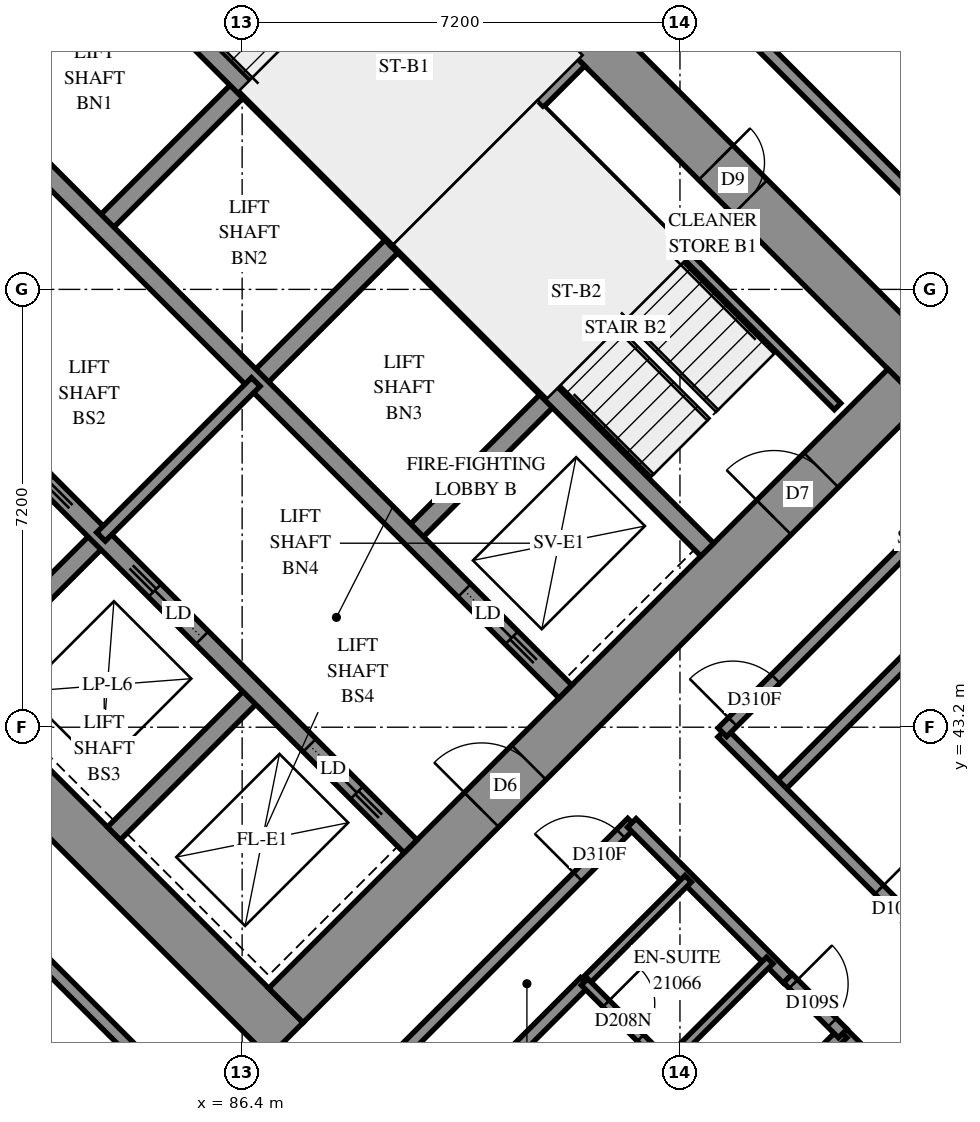
"""IFC4 building model, lengths in metres.
Left out: names, types, materials, properties, quantities, classifications, styles, units other than length and angle.
Written with IfcOpenShell. Run it as: python <this file> out.ifc"""

import sys

from ifc_helpers import new_model, si_unit, direction, frame, frame_2d, origin, place, context, subcontext, project, spatial, polyline, rectangle, outline, extrude, element, fill, save


model = new_model("IFC4")
c1 = context("Model", 3, precision=1e-05, world=origin(), true_north=direction((0.0, 1.0)))
c2 = subcontext(c1, "Body", "Model", "MODEL_VIEW")
j1 = project(units=[si_unit("LENGTHUNIT", "METRE"), si_unit("PLANEANGLEUNIT", "RADIAN")], contexts=[c1])
p1 = place(None, origin())
s1 = spatial("IfcSite", under=j1, at=p1, CompositionType="ELEMENT")
p2 = place(p1, origin())
s2 = spatial("IfcBuilding", under=s1, at=p2, CompositionType="ELEMENT")
p3 = place(p2, frame((0.0, 0.0, 81.2)))
s3 = spatial("IfcBuildingStorey", under=s2, at=p3, CompositionType="ELEMENT", Elevation=81.2)
p4 = place(p3, frame((75.806, 49.373, -0.3), z_axis=(0.0, 0.0, 1.0), x_axis=(0.7071067812, -0.7071067812, 0.0)))
e1 = element("IfcWall", 1, at=p4, inside=s3, PredefinedType="SHEAR", context=c2, shape_type="SweptSolid", body=[
    extrude(rectangle(XDim=16.0, YDim=0.8, at=frame_2d((8.0, 0.0))), origin(), (0.0, 0.0, 1.0), 2.7),
])
p5 = place(p3, frame((86.554, 60.121, -0.3), z_axis=(0.0, 0.0, 1.0), x_axis=(0.7071067812, -0.7071067812, 0.0)))
e2 = element("IfcWall", 2, at=p5, inside=s3, PredefinedType="SHEAR", context=c2, shape_type="SweptSolid", body=[
    extrude(rectangle(XDim=16.0, YDim=0.8, at=frame_2d((8.0, 0.0))), origin(), (0.0, 0.0, 1.0), 2.7),
])
p6 = place(p5, frame((10.8, 0.0, 0.3)))
e3 = element("IfcOpeningElement", 3, at=p6, cuts=e2, PredefinedType="OPENING", context=c2, shape_type="SweptSolid", body=[
    extrude(rectangle(XDim=0.8, YDim=2.1, at=frame_2d((0.4, 1.05))), frame((0.0, 0.41, 0.0), z_axis=(0.0, -1.0, 0.0), x_axis=(1.0, 0.0, 0.0)), (0.0, 0.0, 1.0), 0.82),
])
p7 = place(p3, frame((76.372, 49.373, -0.3), z_axis=(0.0, 0.0, 1.0), x_axis=(0.7071067812, 0.7071067812, 0.0)))
e4 = element("IfcWall", 4, at=p7, inside=s3, PredefinedType="SHEAR", context=c2, shape_type="SweptSolid", body=[
    extrude(rectangle(XDim=14.4, YDim=0.8, at=frame_2d((7.2, 0.0))), origin(), (0.0, 0.0, 1.0), 2.7),
])
p8 = place(p7, frame((4.55, 0.0, 0.3)))
e5 = element("IfcOpeningElement", 5, at=p8, cuts=e4, PredefinedType="OPENING", context=c2, shape_type="SweptSolid", body=[
    extrude(rectangle(XDim=1.1, YDim=2.1, at=frame_2d((0.55, 1.05))), frame((0.0, 0.41, 0.0), z_axis=(0.0, -1.0, 0.0), x_axis=(1.0, 0.0, 0.0)), (0.0, 0.0, 1.0), 0.82),
])
p9 = place(p7, frame((11.35, 0.0, 0.3)))
e6 = element("IfcOpeningElement", 6, at=p9, cuts=e4, PredefinedType="OPENING", context=c2, shape_type="SweptSolid", body=[
    extrude(rectangle(XDim=1.1, YDim=2.1, at=frame_2d((0.55, 1.05))), frame((0.0, 0.41, 0.0), z_axis=(0.0, -1.0, 0.0), x_axis=(1.0, 0.0, 0.0)), (0.0, 0.0, 1.0), 0.82),
])
p10 = place(p3, frame((87.12, 38.625, -0.3), z_axis=(0.0, 0.0, 1.0), x_axis=(0.7071067812, 0.7071067812, 0.0)))
e7 = element("IfcWall", 7, at=p10, inside=s3, PredefinedType="SHEAR", context=c2, shape_type="SweptSolid", body=[
    extrude(rectangle(XDim=14.4, YDim=0.8, at=frame_2d((7.2, 0.0))), origin(), (0.0, 0.0, 1.0), 2.7),
])
p11 = place(p10, frame((4.55, 0.0, 0.3)))
e8 = element("IfcOpeningElement", 8, at=p11, cuts=e7, PredefinedType="OPENING", context=c2, shape_type="SweptSolid", body=[
    extrude(rectangle(XDim=1.1, YDim=2.1, at=frame_2d((0.55, 1.05))), frame((0.0, 0.41, 0.0), z_axis=(0.0, -1.0, 0.0), x_axis=(1.0, 0.0, 0.0)), (0.0, 0.0, 1.0), 0.82),
])
p12 = place(p10, frame((11.35, 0.0, 0.3)))
e9 = element("IfcOpeningElement", 9, at=p12, cuts=e7, PredefinedType="OPENING", context=c2, shape_type="SweptSolid", body=[
    extrude(rectangle(XDim=1.1, YDim=2.1, at=frame_2d((0.55, 1.05))), frame((0.0, 0.41, 0.0), z_axis=(0.0, -1.0, 0.0), x_axis=(1.0, 0.0, 0.0)), (0.0, 0.0, 1.0), 0.82),
])
p13 = place(p3, frame((84.079, 51.423, 0.0), z_axis=(0.0, 0.0, 1.0), x_axis=(0.7071219326, 0.7070916295, 0.0)))
e10 = element("IfcWall", 10, at=p13, inside=s3, PredefinedType="SOLIDWALL", context=c2, shape_type="SweptSolid", body=[
    extrude(rectangle(XDim=3.3, YDim=0.3, at=frame_2d((1.65, 0.0))), origin(), (0.0, 0.0, 1.0), 3.1),
])
p14 = place(p3, frame((81.746, 43.999, 0.0), z_axis=(0.0, 0.0, 1.0), x_axis=(0.7071067812, 0.7071067812, 0.0)))
e11 = element("IfcWall", 11, at=p14, inside=s3, PredefinedType="SOLIDWALL", context=c2, shape_type="SweptSolid", body=[
    extrude(rectangle(XDim=3.3, YDim=0.3, at=frame_2d((1.65, 0.0))), origin(), (0.0, 0.0, 1.0), 3.1),
])
p15 = place(p3, frame((86.625, 48.878, 0.0), z_axis=(0.0, 0.0, 1.0), x_axis=(0.7071067812, 0.7071067812, 0.0)))
e12 = element("IfcWall", 12, at=p15, inside=s3, PredefinedType="SOLIDWALL", context=c2, shape_type="SweptSolid", body=[
    extrude(rectangle(XDim=3.3, YDim=0.3, at=frame_2d((1.65, 0.0))), origin(), (0.0, 0.0, 1.0), 3.1),
])
p16 = place(p3, frame((84.291, 41.453, 0.0), z_axis=(0.0, 0.0, 1.0), x_axis=(0.7071067812, 0.7071067812, 0.0)))
e13 = element("IfcWall", 13, at=p16, inside=s3, PredefinedType="SOLIDWALL", context=c2, shape_type="SweptSolid", body=[
    extrude(rectangle(XDim=3.3, YDim=0.3, at=frame_2d((1.65, 0.0))), origin(), (0.0, 0.0, 1.0), 3.1),
])
p17 = place(p3, frame((89.17, 46.332, 0.0), z_axis=(0.0, 0.0, 1.0), x_axis=(0.7071067812, 0.7071067812, 0.0)))
e14 = element("IfcWall", 14, at=p17, inside=s3, PredefinedType="SOLIDWALL", context=c2, shape_type="SweptSolid", body=[
    extrude(rectangle(XDim=3.3, YDim=0.3, at=frame_2d((1.65, 0.0))), origin(), (0.0, 0.0, 1.0), 3.1),
])
p18 = place(p3, frame((78.988, 51.423, 0.0), z_axis=(0.0, 0.0, 1.0), x_axis=(0.7071067812, -0.7071067812, 0.0)))
e15 = element("IfcWall", 15, at=p18, inside=s3, PredefinedType="SOLIDWALL", context=c2, shape_type="SweptSolid", body=[
    extrude(rectangle(XDim=14.4, YDim=0.3, at=frame_2d((7.2, 0.0))), origin(), (0.0, 0.0, 1.0), 3.1),
])
p19 = place(p18, frame((1.25, 0.0, 0.0)))
e16 = element("IfcOpeningElement", 16, at=p19, cuts=e15, PredefinedType="OPENING", context=c2, shape_type="SweptSolid", body=[
    extrude(rectangle(XDim=1.1, YDim=2.1, at=frame_2d((0.55, 1.05))), frame((0.0, 0.16, 0.0), z_axis=(0.0, -1.0, 0.0), x_axis=(1.0, 0.0, 0.0)), (0.0, 0.0, 1.0), 0.32),
])
p20 = place(p18, frame((4.85, 0.0, 0.0)))
e17 = element("IfcOpeningElement", 17, at=p20, cuts=e15, PredefinedType="OPENING", context=c2, shape_type="SweptSolid", body=[
    extrude(rectangle(XDim=1.1, YDim=2.1, at=frame_2d((0.55, 1.05))), frame((0.0, 0.16, 0.0), z_axis=(0.0, -1.0, 0.0), x_axis=(1.0, 0.0, 0.0)), (0.0, 0.0, 1.0), 0.32),
])
p21 = place(p18, frame((8.45, 0.0, 0.0)))
e18 = element("IfcOpeningElement", 18, at=p21, cuts=e15, PredefinedType="OPENING", context=c2, shape_type="SweptSolid", body=[
    extrude(rectangle(XDim=1.1, YDim=2.1, at=frame_2d((0.55, 1.05))), frame((0.0, 0.16, 0.0), z_axis=(0.0, -1.0, 0.0), x_axis=(1.0, 0.0, 0.0)), (0.0, 0.0, 1.0), 0.32),
])
p22 = place(p18, frame((12.05, 0.0, 0.0)))
e19 = element("IfcOpeningElement", 19, at=p22, cuts=e15, PredefinedType="OPENING", context=c2, shape_type="SweptSolid", body=[
    extrude(rectangle(XDim=1.1, YDim=2.1, at=frame_2d((0.55, 1.05))), frame((0.0, 0.16, 0.0), z_axis=(0.0, -1.0, 0.0), x_axis=(1.0, 0.0, 0.0)), (0.0, 0.0, 1.0), 0.32),
])
p23 = place(p3, frame((81.534, 53.969, 0.0), z_axis=(0.0, 0.0, 1.0), x_axis=(0.707103309, -0.7071102534, 0.0)))
e20 = element("IfcWall", 20, at=p23, inside=s3, PredefinedType="SOLIDWALL", context=c2, shape_type="SweptSolid", body=[
    extrude(rectangle(XDim=14.4, YDim=0.3, at=frame_2d((7.2, 0.0))), origin(), (0.0, 0.0, 1.0), 3.1),
])
p24 = place(p23, frame((12.05, 0.0, 0.0)))
e21 = element("IfcOpeningElement", 21, at=p24, cuts=e20, PredefinedType="OPENING", context=c2, shape_type="SweptSolid", body=[
    extrude(rectangle(XDim=1.1, YDim=2.1, at=frame_2d((0.55, 1.05))), frame((0.0, 0.16, 0.0), z_axis=(0.0, -1.0, 0.0), x_axis=(1.0, 0.0, 0.0)), (0.0, 0.0, 1.0), 0.32),
])
for number, where, z_axis, x_axis in (
    (22, (83.867, 56.302, 0.0), (0.0, 0.0, 1.0), (0.707, -0.707, 0.0)),
    (23, (88.958, 51.211, 0.0), (0.0, 0.0, 1.0), (0.707, -0.707, 0.0)),
):
    element("IfcWall", number, at=place(p3, frame(where, z_axis=z_axis, x_axis=x_axis)), inside=s3, PredefinedType="SOLIDWALL", context=c2, shape_type="SweptSolid", body=[
        extrude(rectangle(XDim=7.2, YDim=0.3, at=frame_2d((3.6, 0.0))), origin(), (0.0, 0.0, 1.0), 3.1),
    ])
p25 = place(p3, frame((88.958, 51.211, 0.0), z_axis=(0.0, 0.0, 1.0), x_axis=(0.7071067812, 0.7071067812, 0.0)))
e24 = element("IfcWall", 24, at=p25, inside=s3, PredefinedType="SOLIDWALL", context=c2, shape_type="SweptSolid", body=[
    extrude(rectangle(XDim=4.2, YDim=0.3, at=frame_2d((2.1, 0.0))), origin(), (0.0, 0.0, 1.0), 3.1),
])
p26 = place(p3, frame((98.712, 54.219, 0.0), z_axis=(0.0, 0.0, 1.0), x_axis=(-0.7664437954, 0.6423113798, 0.0)))
e25 = element("IfcWall", 25, at=p26, inside=s3, PredefinedType="SOLIDWALL", context=c2, shape_type="SweptSolid", body=[
    extrude(outline(polyline([(-0.024, -0.275), (3.394, -0.275), (3.442, 0.275), (0.024, 0.275), (-0.024, -0.275)])), origin(), (0.0, 0.0, 1.0), 3.1),
])
p27 = place(p26, frame((1.596, 0.0, 0.5)))
e26 = element("IfcOpeningElement", 26, at=p27, cuts=e25, PredefinedType="OPENING", context=c2, shape_type="SweptSolid", body=[
    extrude(rectangle(XDim=1.2, YDim=2.45, at=frame_2d((0.6, 1.225))), frame((0.0, 0.285, 0.0), z_axis=(0.0, -1.0, 0.0), x_axis=(1.0, 0.0, 0.0)), (0.0, 0.0, 1.0), 0.57),
])
p28 = place(p3, frame((91.313, 53.354, 0.0), z_axis=(0.0, 0.0, 1.0), x_axis=(0.7071140275, -0.7070995348, 0.0)))
e27 = element("IfcWall", 27, at=p28, inside=s3, PredefinedType="PARTITIONING", context=c2, shape_type="SweptSolid", body=[
    extrude(rectangle(XDim=6.9, YDim=0.15, at=frame_2d((3.45, 0.0))), origin(), (0.0, 0.0, 1.0), 3.1),
])
p29 = place(p3, frame((84.079, 46.332, 0.0), z_axis=(0.0, 0.0, 1.0), x_axis=(0.7071067812, 0.7071067812, 0.0)))
e28 = element("IfcWall", 28, at=p29, inside=s3, PredefinedType="PARTITIONING", context=c2, shape_type="SweptSolid", body=[
    extrude(rectangle(XDim=3.6, YDim=0.2, at=frame_2d((1.8, 0.0))), origin(), (0.0, 0.0, 1.0), 3.1),
])
p30 = place(p3, frame((87.894, 61.461, 0.0), z_axis=(0.0, 0.0, 1.0), x_axis=(0.7071067812, -0.7071067812, 0.0)))
e29 = element("IfcWall", 29, at=p30, inside=s3, PredefinedType="PARTITIONING", context=c2, shape_type="SweptSolid", body=[
    extrude(rectangle(XDim=17.5, YDim=0.2, at=frame_2d((8.75, 0.0))), origin(), (0.0, 0.0, 1.0), 3.1),
])
p31 = place(p30, frame((8.735, 0.0, 0.0)))
e30 = element("IfcOpeningElement", 30, at=p31, cuts=e29, PredefinedType="OPENING", context=c2, shape_type="SweptSolid", body=[
    extrude(rectangle(XDim=0.9, YDim=2.1, at=frame_2d((0.45, 1.05))), frame((0.0, 0.11, 0.0), z_axis=(0.0, -1.0, 0.0), x_axis=(1.0, 0.0, 0.0)), (0.0, 0.0, 1.0), 0.22),
])
p32 = place(p3, frame((95.215, 42.197, 0.0), z_axis=(0.0, 0.0, 1.0), x_axis=(0.7071114855, 0.7071020769, 0.0)))
e31 = element("IfcWall", 31, at=p32, inside=s3, PredefinedType="PARTITIONING", context=c2, shape_type="SweptSolid", body=[
    extrude(rectangle(XDim=10.629, YDim=0.2, at=frame_2d((5.314, 0.0))), origin(), (0.0, 0.0, 1.0), 3.1),
])
p33 = place(p3, frame((94.294, 43.111, 0.0), z_axis=(0.0, 0.0, 1.0), x_axis=(0.7071067812, -0.7071067812, 0.0)))
e32 = element("IfcWall", 32, at=p33, inside=s3, PredefinedType="PARTITIONING", context=c2, shape_type="SweptSolid", body=[
    extrude(rectangle(XDim=8.499, YDim=0.2, at=frame_2d((4.25, 0.0))), origin(), (0.0, 0.0, 1.0), 3.1),
])
p34 = place(p33, frame((3.651, 0.0, 0.0)))
e33 = element("IfcOpeningElement", 33, at=p34, cuts=e32, PredefinedType="OPENING", context=c2, shape_type="SweptSolid", body=[
    extrude(rectangle(XDim=0.9, YDim=2.1, at=frame_2d((0.45, 1.05))), frame((0.0, 0.11, 0.0), z_axis=(0.0, -1.0, 0.0), x_axis=(1.0, 0.0, 0.0)), (0.0, 0.0, 1.0), 0.22),
])
p35 = place(p3, frame((86.835, 35.655, 0.0), z_axis=(0.0, 0.0, 1.0), x_axis=(0.7071067812, 0.7071067812, 0.0)))
e34 = element("IfcWall", 34, at=p35, inside=s3, PredefinedType="PARTITIONING", context=c2, shape_type="SweptSolid", body=[
    extrude(rectangle(XDim=8.451, YDim=0.2, at=frame_2d((4.226, 0.0))), origin(), (0.0, 0.0, 1.0), 3.1),
])
p36 = place(p35, frame((7.192, 0.0, 0.0)))
e35 = element("IfcOpeningElement", 35, at=p36, cuts=e34, PredefinedType="OPENING", context=c2, shape_type="SweptSolid", body=[
    extrude(rectangle(XDim=1.0, YDim=2.1, at=frame_2d((0.5, 1.05))), frame((0.0, 0.11, 0.0), z_axis=(0.0, -1.0, 0.0), x_axis=(1.0, 0.0, 0.0)), (0.0, 0.0, 1.0), 0.22),
])
p37 = place(p3, frame((94.297, 43.117, 0.0), z_axis=(0.0, 0.0, 1.0), x_axis=(0.7071067812, 0.7071067812, 0.0)))
e36 = element("IfcWall", 36, at=p37, inside=s3, PredefinedType="PARTITIONING", context=c2, shape_type="SweptSolid", body=[
    extrude(rectangle(XDim=8.448, YDim=0.2, at=frame_2d((4.224, 0.0))), origin(), (0.0, 0.0, 1.0), 3.1),
])
p38 = place(p37, frame((0.242, 0.0, 0.0)))
e37 = element("IfcOpeningElement", 37, at=p38, cuts=e36, PredefinedType="OPENING", context=c2, shape_type="SweptSolid", body=[
    extrude(rectangle(XDim=1.0, YDim=2.1, at=frame_2d((0.5, 1.05))), frame((0.0, 0.11, 0.0), z_axis=(0.0, -1.0, 0.0), x_axis=(1.0, 0.0, 0.0)), (0.0, 0.0, 1.0), 0.22),
])
p39 = place(p3, frame((86.351, 33.325, 0.0), z_axis=(0.0, 0.0, 1.0), x_axis=(0.7069824066, 0.7072311339, 0.0)))
e38 = element("IfcWall", 38, at=p39, inside=s3, PredefinedType="PARTITIONING", context=c2, shape_type="SweptSolid", body=[
    extrude(rectangle(XDim=8.041, YDim=0.2, at=frame_2d((4.021, 0.0))), origin(), (0.0, 0.0, 1.0), 3.1),
])
p40 = place(p3, frame((80.948, 41.536, 0.0), z_axis=(0.0, 0.0, 1.0), x_axis=(0.7071067812, -0.7071067812, 0.0)))
e39 = element("IfcWall", 39, at=p40, inside=s3, PredefinedType="PARTITIONING", context=c2, shape_type="SweptSolid", body=[
    extrude(rectangle(XDim=6.822, YDim=0.2, at=frame_2d((3.411, 0.0))), origin(), (0.0, 0.0, 1.0), 3.1),
])
p41 = place(p3, frame((92.809, 41.627, 0.0), z_axis=(0.0, 0.0, 1.0), x_axis=(0.7071067812, -0.7071067812, 0.0)))
e40 = element("IfcWall", 40, at=p41, inside=s3, PredefinedType="PARTITIONING", context=c2, shape_type="SweptSolid", body=[
    extrude(rectangle(XDim=3.623, YDim=0.2, at=frame_2d((1.812, 0.0))), origin(), (0.0, 0.0, 1.0), 3.1),
])
p42 = place(p3, frame((96.274, 38.162, 0.0), z_axis=(0.0, 0.0, 1.0), x_axis=(0.7071067812, -0.7071067812, 0.0)))
e41 = element("IfcWall", 41, at=p42, inside=s3, PredefinedType="PARTITIONING", context=c2, shape_type="SweptSolid", body=[
    extrude(rectangle(XDim=3.1, YDim=0.2, at=frame_2d((1.55, 0.0))), origin(), (0.0, 0.0, 1.0), 3.1),
])
for number, where, z_axis, x_axis in (
    (42, (92.037, 39.011, 0.0), (0.0, 0.0, 1.0), (0.708, 0.707, 0.0)),
    (43, (93.381, 37.667, 0.0), (0.0, 0.0, 1.0), (0.707, 0.708, 0.0)),
):
    element("IfcWall", number, at=place(p3, frame(where, z_axis=z_axis, x_axis=x_axis)), inside=s3, PredefinedType="PARTITIONING", context=c2, shape_type="SweptSolid", body=[
        extrude(rectangle(XDim=2.4, YDim=0.15, at=frame_2d((1.2, 0.0))), origin(), (0.0, 0.0, 1.0), 3.1),
    ])
p43 = place(p3, frame((92.031, 39.011, 0.0), z_axis=(0.0, 0.0, 1.0), x_axis=(0.7071067812, -0.7071067812, 0.0)))
e44 = element("IfcWall", 44, at=p43, inside=s3, PredefinedType="PARTITIONING", context=c2, shape_type="SweptSolid", body=[
    extrude(rectangle(XDim=1.901, YDim=0.15, at=frame_2d((0.95, 0.0))), origin(), (0.0, 0.0, 1.0), 3.1),
])
p44 = place(p43, frame((0.502, 0.0, 0.0)))
e45 = element("IfcOpeningElement", 45, at=p44, cuts=e44, PredefinedType="OPENING", context=c2, shape_type="SweptSolid", body=[
    extrude(rectangle(XDim=0.8, YDim=2.1, at=frame_2d((0.4, 1.05))), frame((0.0, 0.085, 0.0), z_axis=(0.0, -1.0, 0.0), x_axis=(1.0, 0.0, 0.0)), (0.0, 0.0, 1.0), 0.17),
])
p45 = place(p3, frame((94.973, 36.863, 0.0), z_axis=(0.0, 0.0, 1.0), x_axis=(0.7071067812, 0.7071067812, 0.0)))
e46 = element("IfcWall", 46, at=p45, inside=s3, PredefinedType="PARTITIONING", context=c2, shape_type="SweptSolid", body=[
    extrude(rectangle(XDim=1.841, YDim=0.2, at=frame_2d((0.921, 0.0))), origin(), (0.0, 0.0, 1.0), 3.1),
])
p46 = place(p3, frame((95.375, 39.069, 0.0), z_axis=(0.0, 0.0, 1.0), x_axis=(0.7063232841, -0.7078894111, 0.0)))
e47 = element("IfcWall", 47, at=p46, inside=s3, PredefinedType="PARTITIONING", context=c2, shape_type="SweptSolid", body=[
    extrude(rectangle(XDim=1.277, YDim=0.2, at=frame_2d((0.638, 0.0))), origin(), (0.0, 0.0, 1.0), 3.1),
])
p47 = place(p46, frame((0.129, 0.0, 0.0)))
e48 = element("IfcOpeningElement", 48, at=p47, cuts=e47, PredefinedType="OPENING", context=c2, shape_type="SweptSolid", body=[
    extrude(rectangle(XDim=0.9, YDim=2.1, at=frame_2d((0.45, 1.05))), frame((0.0, 0.11, 0.0), z_axis=(0.0, -1.0, 0.0), x_axis=(1.0, 0.0, 0.0)), (0.0, 0.0, 1.0), 0.22),
])
p48 = place(p6, origin())
e49 = element("IfcDoor", 49, at=p48, inside=s3, OperationType="SINGLE_SWING_RIGHT", PredefinedType="DOOR", context=c2, shape_type="SweptSolid", body=[
    extrude(rectangle(XDim=0.8, YDim=2.1, at=frame_2d((0.4, 1.05))), frame((0.0, -0.34, 0.0), z_axis=(0.0, -1.0, 0.0), x_axis=(1.0, 0.0, 0.0)), (0.0, 0.0, 1.0), 0.05),
])
fill(e3, e49)
p49 = place(p11, origin())
e50 = element("IfcDoor", 50, at=p49, inside=s3, OperationType="DOUBLE_DOOR_SINGLE_SWING", PredefinedType="DOOR", context=c2, shape_type="SweptSolid", body=[
    extrude(rectangle(XDim=1.1, YDim=2.1, at=frame_2d((0.55, 1.05))), frame((0.0, 0.025, 0.0), z_axis=(0.0, -1.0, 0.0), x_axis=(1.0, 0.0, 0.0)), (0.0, 0.0, 1.0), 0.05),
])
fill(e8, e50)
p50 = place(p12, origin())
e51 = element("IfcDoor", 51, at=p50, inside=s3, OperationType="SINGLE_SWING_RIGHT", PredefinedType="DOOR", context=c2, shape_type="SweptSolid", body=[
    extrude(rectangle(XDim=1.1, YDim=2.1, at=frame_2d((0.55, 1.05))), frame((0.0, 0.025, 0.0), z_axis=(0.0, -1.0, 0.0), x_axis=(1.0, 0.0, 0.0)), (0.0, 0.0, 1.0), 0.05),
])
fill(e9, e51)
p51 = place(p21, origin())
e52 = element("IfcDoor", 52, at=p51, inside=s3, OperationType="SLIDING_TO_LEFT", PredefinedType="DOOR", context=c2, shape_type="SweptSolid", body=[
    extrude(rectangle(XDim=1.1, YDim=2.1, at=frame_2d((0.55, 1.05))), frame((0.0, 0.025, 0.0), z_axis=(0.0, -1.0, 0.0), x_axis=(1.0, 0.0, 0.0)), (0.0, 0.0, 1.0), 0.05),
])
fill(e18, e52)
p52 = place(p22, origin())
e53 = element("IfcDoor", 53, at=p52, inside=s3, OperationType="SLIDING_TO_RIGHT", PredefinedType="DOOR", context=c2, shape_type="SweptSolid", body=[
    extrude(rectangle(XDim=1.1, YDim=2.1, at=frame_2d((0.55, 1.05))), frame((0.0, 0.025, 0.0), z_axis=(0.0, -1.0, 0.0), x_axis=(1.0, 0.0, 0.0)), (0.0, 0.0, 1.0), 0.05),
])
fill(e19, e53)
p53 = place(p24, origin())
e54 = element("IfcDoor", 54, at=p53, inside=s3, OperationType="SLIDING_TO_RIGHT", PredefinedType="DOOR", context=c2, shape_type="SweptSolid", body=[
    extrude(rectangle(XDim=1.1, YDim=2.1, at=frame_2d((0.55, 1.05))), frame((0.0, 0.025, 0.0), z_axis=(0.0, -1.0, 0.0), x_axis=(1.0, 0.0, 0.0)), (0.0, 0.0, 1.0), 0.05),
])
fill(e21, e54)
p54 = place(p38, origin())
e55 = element("IfcDoor", 55, at=p54, inside=s3, OperationType="SINGLE_SWING_LEFT", PredefinedType="DOOR", context=c2, shape_type="SweptSolid", body=[
    extrude(rectangle(XDim=1.0, YDim=2.1, at=frame_2d((0.5, 1.05))), frame((0.0, 0.025, 0.0), z_axis=(0.0, -1.0, 0.0), x_axis=(1.0, 0.0, 0.0)), (0.0, 0.0, 1.0), 0.05),
])
fill(e37, e55)
p55 = place(p34, origin())
e56 = element("IfcDoor", 56, at=p55, inside=s3, OperationType="SINGLE_SWING_RIGHT", PredefinedType="DOOR", context=c2, shape_type="SweptSolid", body=[
    extrude(rectangle(XDim=0.9, YDim=2.1, at=frame_2d((0.45, 1.05))), frame((0.0, 0.025, 0.0), z_axis=(0.0, -1.0, 0.0), x_axis=(1.0, 0.0, 0.0)), (0.0, 0.0, 1.0), 0.05),
])
fill(e33, e56)
p56 = place(p36, origin())
e57 = element("IfcDoor", 57, at=p56, inside=s3, OperationType="SINGLE_SWING_RIGHT", PredefinedType="DOOR", context=c2, shape_type="SweptSolid", body=[
    extrude(rectangle(XDim=1.0, YDim=2.1, at=frame_2d((0.5, 1.05))), frame((0.0, 0.025, 0.0), z_axis=(0.0, -1.0, 0.0), x_axis=(1.0, 0.0, 0.0)), (0.0, 0.0, 1.0), 0.05),
])
fill(e35, e57)
p57 = place(p47, origin())
e58 = element("IfcDoor", 58, at=p57, inside=s3, OperationType="SINGLE_SWING_LEFT", PredefinedType="DOOR", context=c2, shape_type="SweptSolid", body=[
    extrude(rectangle(XDim=0.9, YDim=2.1, at=frame_2d((0.45, 1.05))), frame((0.0, 0.025, 0.0), z_axis=(0.0, -1.0, 0.0), x_axis=(1.0, 0.0, 0.0)), (0.0, 0.0, 1.0), 0.05),
])
fill(e48, e58)
p58 = place(p44, origin())
e59 = element("IfcDoor", 59, at=p58, inside=s3, OperationType="SINGLE_SWING_RIGHT", PredefinedType="DOOR", context=c2, shape_type="SweptSolid", body=[
    extrude(rectangle(XDim=0.8, YDim=2.1, at=frame_2d((0.4, 1.05))), frame((0.0, 0.025, 0.0), z_axis=(0.0, -1.0, 0.0), x_axis=(1.0, 0.0, 0.0)), (0.0, 0.0, 1.0), 0.05),
])
fill(e45, e59)
save(model, sys.argv[1])
